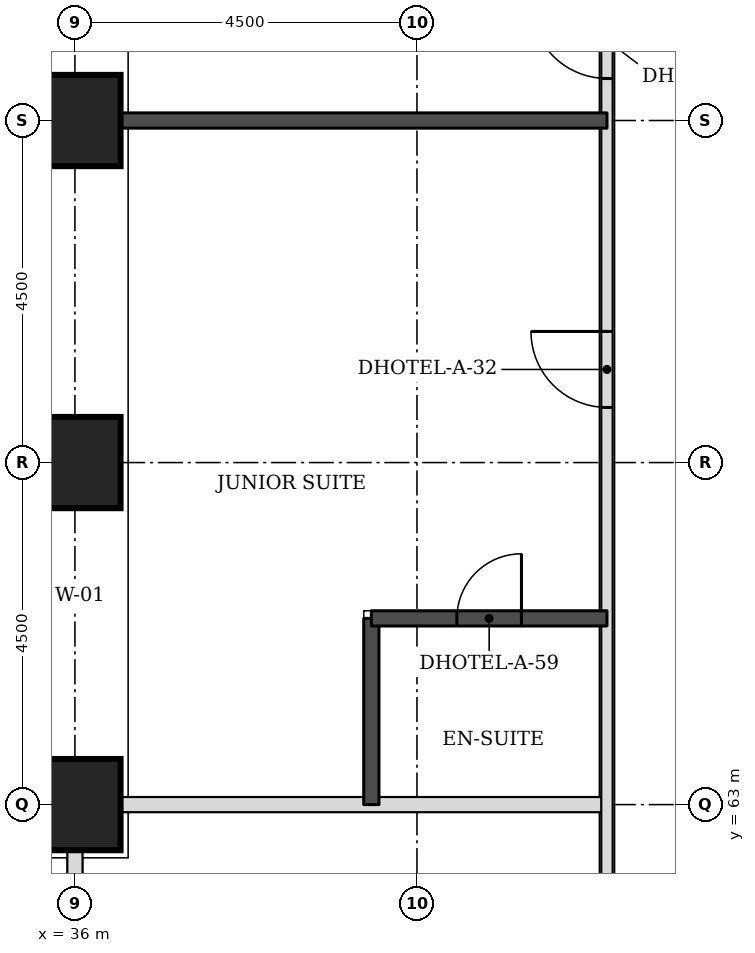
"""IFC4 building model, lengths in metres.
Left out: names, types, materials, properties, quantities, classifications, styles, units other than length and angle.
Written with IfcOpenShell. Run it as: python <this file> out.ifc"""

import sys

from ifc_helpers import new_model, si_unit, direction, frame, frame_2d, origin, origin_2d, place, context, subcontext, project, spatial, rectangle, extrude, element, fill, save


model = new_model("IFC4")
c1 = context("Model", 3, precision=1e-05, world=origin(), true_north=direction((0.0, 1.0)))
c2 = subcontext(c1, "Body", "Model", "MODEL_VIEW")
j1 = project(units=[si_unit("LENGTHUNIT", "METRE"), si_unit("PLANEANGLEUNIT", "RADIAN")], contexts=[c1])
p1 = place(None, origin())
s1 = spatial("IfcSite", under=j1, at=p1, CompositionType="ELEMENT")
p2 = place(p1, origin())
s2 = spatial("IfcBuilding", under=s1, at=p2, CompositionType="ELEMENT")
p3 = place(p2, frame((0.0, 0.0, 26.4)))
s3 = spatial("IfcBuildingStorey", under=s2, at=p3, CompositionType="ELEMENT", Elevation=26.4)
for number, where, z_axis, x_axis in (
    (1, (36.0, 63.0, 0.0), (0.0, 0.0, 1.0), (1.0, 0.0, 0.0)),
    (2, (36.0, 67.5, 0.0), (0.0, 0.0, 1.0), (1.0, 0.0, 0.0)),
    (3, (36.0, 72.0, 0.0), (0.0, 0.0, 1.0), (1.0, 0.0, 0.0)),
):
    element("IfcColumn", number, at=place(p3, frame(where, z_axis=z_axis, x_axis=x_axis)), inside=s3, PredefinedType="COLUMN", context=c2, shape_type="SweptSolid", body=[
        extrude(rectangle(XDim=1.2, YDim=1.2, at=origin_2d()), origin(), (0.0, 0.0, 1.0), 3.3),
    ])
p4 = place(p3, frame((36.0, 56.0, 0.0), z_axis=(0.0, 0.0, 1.0), x_axis=(0.0, 1.0, 0.0)))
e4 = element("IfcWall", 4, at=p4, inside=s3, PredefinedType="PARTITIONING", context=c2, shape_type="SweptSolid", body=[
    extrude(rectangle(XDim=6.4, YDim=0.2, at=frame_2d((3.2, 0.0))), origin(), (0.0, 0.0, 1.0), 2.33),
])
p5 = place(p3, frame((36.6, 63.0, 0.0), z_axis=(0.0, 0.0, 1.0), x_axis=(1.0, 0.0, 0.0)))
e5 = element("IfcWall", 5, at=p5, inside=s3, PredefinedType="PARTITIONING", context=c2, shape_type="SweptSolid", body=[
    extrude(rectangle(XDim=6.4, YDim=0.2, at=frame_2d((3.2, 0.0))), origin(), (0.0, 0.0, 1.0), 3.08),
])
p6 = place(p3, frame((43.0, 56.0, 0.0), z_axis=(0.0, 0.0, 1.0), x_axis=(0.0, 1.0, 0.0)))
e6 = element("IfcWall", 6, at=p6, inside=s3, PredefinedType="PARTITIONING", context=c2, shape_type="SweptSolid", body=[
    extrude(rectangle(XDim=18.0, YDim=0.15, at=frame_2d((9.0, 0.0))), origin(), (0.0, 0.0, 1.0), 3.08),
])
p7 = place(p6, frame((12.225, 0.0, 0.0)))
e7 = element("IfcOpeningElement", 7, at=p7, cuts=e6, PredefinedType="OPENING", context=c2, shape_type="SweptSolid", body=[
    extrude(rectangle(XDim=1.0, YDim=2.1, at=frame_2d((0.5, 1.05))), frame((0.0, 0.085, 0.0), z_axis=(0.0, -1.0, 0.0), x_axis=(1.0, 0.0, 0.0)), (0.0, 0.0, 1.0), 0.17),
])
p8 = place(p6, frame((16.553, 0.0, 0.0)))
e8 = element("IfcOpeningElement", 8, at=p8, cuts=e6, PredefinedType="OPENING", context=c2, shape_type="SweptSolid", body=[
    extrude(rectangle(XDim=1.0, YDim=2.1, at=frame_2d((0.5, 1.05))), frame((0.0, 0.085, 0.0), z_axis=(0.0, -1.0, 0.0), x_axis=(1.0, 0.0, 0.0)), (0.0, 0.0, 1.0), 0.17),
])
p9 = place(p6, frame((3.05, 0.0, 0.0)))
e9 = element("IfcOpeningElement", 9, at=p9, cuts=e6, PredefinedType="OPENING", context=c2, shape_type="SweptSolid", body=[
    extrude(rectangle(XDim=0.9, YDim=2.1, at=frame_2d((0.45, 1.05))), frame((0.0, 0.085, 0.0), z_axis=(0.0, -1.0, 0.0), x_axis=(1.0, 0.0, 0.0)), (0.0, 0.0, 1.0), 0.17),
])
p10 = place(p3, frame((39.9, 63.0, 0.0), z_axis=(0.0, 0.0, 1.0), x_axis=(0.0, 1.0, 0.0)))
e10 = element("IfcWall", 10, at=p10, inside=s3, PredefinedType="SOLIDWALL", context=c2, shape_type="SweptSolid", body=[
    extrude(rectangle(XDim=2.45, YDim=0.2, at=frame_2d((1.225, 0.0))), origin(), (0.0, 0.0, 1.0), 3.08),
])
p11 = place(p3, frame((39.9, 65.45, 0.0), z_axis=(0.0, 0.0, 1.0), x_axis=(1.0, 0.0, 0.0)))
e11 = element("IfcWall", 11, at=p11, inside=s3, PredefinedType="SOLIDWALL", context=c2, shape_type="SweptSolid", body=[
    extrude(rectangle(XDim=3.1, YDim=0.2, at=frame_2d((1.55, 0.0))), origin(), (0.0, 0.0, 1.0), 3.08),
])
p12 = place(p11, frame((1.125, 0.0, 0.0)))
e12 = element("IfcOpeningElement", 12, at=p12, cuts=e11, PredefinedType="OPENING", context=c2, shape_type="SweptSolid", body=[
    extrude(rectangle(XDim=0.85, YDim=2.1, at=frame_2d((0.425, 1.05))), frame((0.0, 0.11, 0.0), z_axis=(0.0, -1.0, 0.0), x_axis=(1.0, 0.0, 0.0)), (0.0, 0.0, 1.0), 0.22),
])
p13 = place(p3, frame((36.6, 72.0, 0.0), z_axis=(0.0, 0.0, 1.0), x_axis=(1.0, 0.0, 0.0)))
e13 = element("IfcWall", 13, at=p13, inside=s3, PredefinedType="SOLIDWALL", context=c2, shape_type="SweptSolid", body=[
    extrude(rectangle(XDim=6.4, YDim=0.2, at=frame_2d((3.2, 0.0))), origin(), (0.0, 0.0, 1.0), 3.08),
])
p14 = place(p7, origin())
e14 = element("IfcDoor", 14, at=p14, inside=s3, OperationType="SINGLE_SWING_RIGHT", PredefinedType="DOOR", context=c2, shape_type="SweptSolid", body=[
    extrude(rectangle(XDim=1.0, YDim=2.1, at=frame_2d((0.5, 1.05))), frame((0.0, 0.025, 0.0), z_axis=(0.0, -1.0, 0.0), x_axis=(1.0, 0.0, 0.0)), (0.0, 0.0, 1.0), 0.05),
])
fill(e7, e14)
p15 = place(p12, origin())
e15 = element("IfcDoor", 15, at=p15, inside=s3, OperationType="SINGLE_SWING_RIGHT", PredefinedType="DOOR", context=c2, shape_type="SweptSolid", body=[
    extrude(rectangle(XDim=0.85, YDim=2.1, at=frame_2d((0.425, 1.05))), frame((0.0, 0.025, 0.0), z_axis=(0.0, -1.0, 0.0), x_axis=(1.0, 0.0, 0.0)), (0.0, 0.0, 1.0), 0.05),
])
fill(e12, e15)
p16 = place(p8, origin())
e16 = element("IfcDoor", 16, at=p16, inside=s3, OperationType="SINGLE_SWING_RIGHT", PredefinedType="DOOR", context=c2, shape_type="SweptSolid", body=[
    extrude(rectangle(XDim=1.0, YDim=2.1, at=frame_2d((0.5, 1.05))), frame((0.0, 0.025, 0.0), z_axis=(0.0, -1.0, 0.0), x_axis=(1.0, 0.0, 0.0)), (0.0, 0.0, 1.0), 0.05),
])
fill(e8, e16)
save(model, sys.argv[1])
